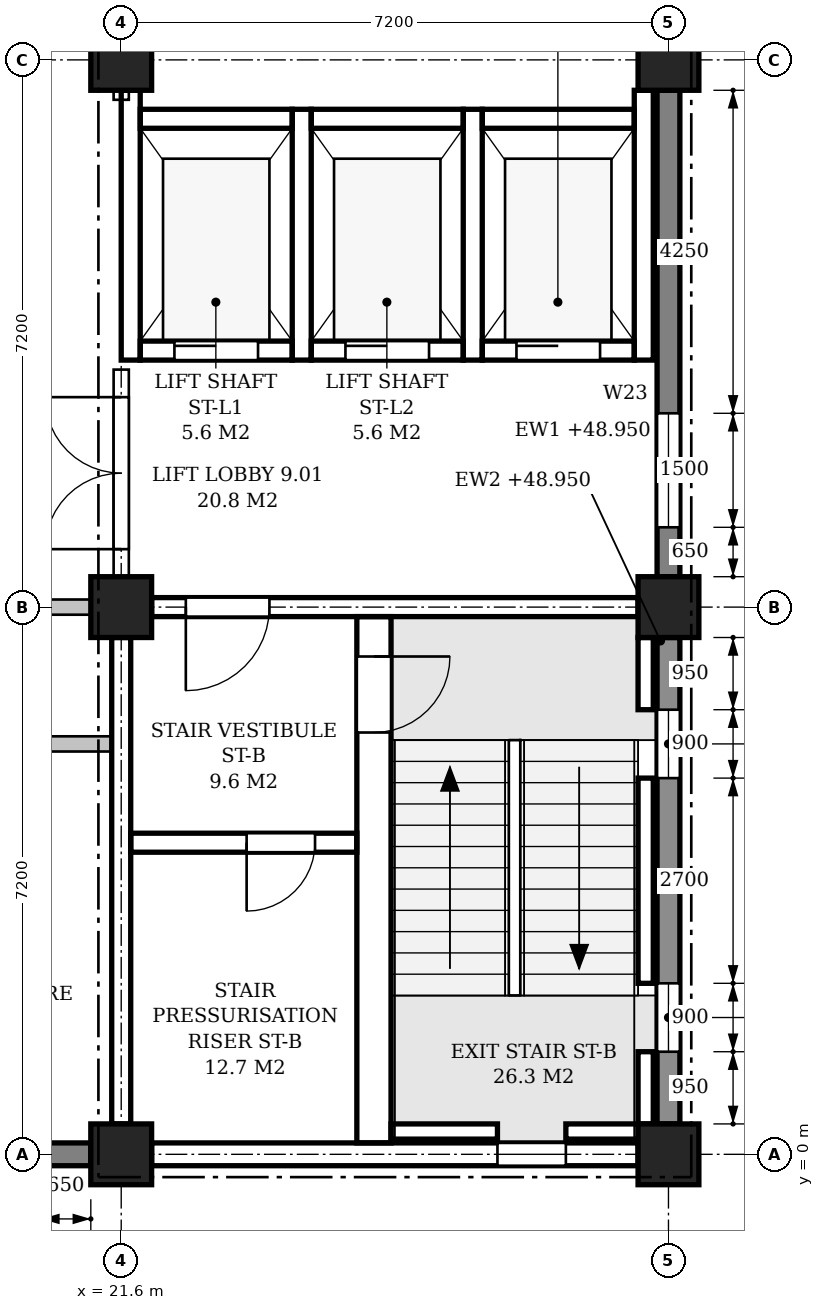
"""IFC4 building model, lengths in metres.
Left out: names, types, materials, properties, quantities, classifications, styles, units other than length and angle.
Written with IfcOpenShell. Run it as: python <this file> out.ifc"""

import sys

from ifc_helpers import new_model, si_unit, direction, frame, frame_2d, origin, origin_2d, place, context, subcontext, project, spatial, polyline, rectangle, outline, extrude, element, fill, save


model = new_model("IFC4")
c1 = context("Model", 3, precision=1e-05, world=origin(), true_north=direction((0.0, 1.0)))
c2 = subcontext(c1, "Body", "Model", "MODEL_VIEW")
j1 = project(units=[si_unit("LENGTHUNIT", "METRE"), si_unit("PLANEANGLEUNIT", "RADIAN")], contexts=[c1])
p1 = place(None, origin())
s1 = spatial("IfcSite", under=j1, at=p1, CompositionType="ELEMENT")
p2 = place(p1, origin())
s2 = spatial("IfcBuilding", under=s1, at=p2, CompositionType="ELEMENT")
p3 = place(p2, frame((0.0, 0.0, 45.3)))
s3 = spatial("IfcBuildingStorey", under=s2, at=p3, CompositionType="ELEMENT", Elevation=45.3)
for number, where, z_axis, x_axis in (
    (1, (21.6, 0.0, 0.0), (0.0, 0.0, 1.0), (1.0, 0.0, 0.0)),
    (2, (21.6, 7.2, 0.0), (0.0, 0.0, 1.0), (1.0, 0.0, 0.0)),
    (3, (21.6, 14.4, 0.0), (0.0, 0.0, 1.0), (1.0, 0.0, 0.0)),
    (4, (28.8, 0.0, 0.0), (0.0, 0.0, 1.0), (1.0, 0.0, 0.0)),
    (5, (28.8, 7.2, 0.0), (0.0, 0.0, 1.0), (1.0, 0.0, 0.0)),
    (6, (28.8, 14.4, 0.0), (0.0, 0.0, 1.0), (1.0, 0.0, 0.0)),
):
    element("IfcColumn", number, at=place(p3, frame(where, z_axis=z_axis, x_axis=x_axis)), inside=s3, PredefinedType="COLUMN", context=c2, shape_type="SweptSolid", body=[
        extrude(rectangle(XDim=0.8, YDim=0.8, at=origin_2d()), origin(), (0.0, 0.0, 1.0), 4.5),
    ])
p4 = place(p3, frame((14.8, 0.0, 0.0), z_axis=(0.0, 0.0, 1.0), x_axis=(1.0, 0.0, 0.0)))
e7 = element("IfcWall", 7, at=p4, inside=s3, PredefinedType="STANDARD", context=c2, shape_type="SweptSolid", body=[
    extrude(rectangle(XDim=6.4, YDim=0.3, at=frame_2d((3.2, 0.0))), origin(), (0.0, 0.0, 1.0), 3.65),
])
p5 = place(p4, frame((0.65, 0.0, 0.9)))
e8 = element("IfcOpeningElement", 8, at=p5, cuts=e7, PredefinedType="OPENING", context=c2, shape_type="SweptSolid", body=[
    extrude(outline(polyline([(0.0, 0.0), (1.5, 0.0), (1.5, 1.95), (0.75, 2.7), (0.0, 1.95), (0.0, 0.0)])), frame((0.0, 0.16, 0.0), z_axis=(0.0, -1.0, 0.0), x_axis=(1.0, 0.0, 0.0)), (0.0, 0.0, 1.0), 0.32),
])
p6 = place(p4, frame((4.25, 0.0, 0.9)))
e9 = element("IfcOpeningElement", 9, at=p6, cuts=e7, PredefinedType="OPENING", context=c2, shape_type="SweptSolid", body=[
    extrude(outline(polyline([(0.0, 0.0), (1.5, 0.0), (1.5, 1.95), (0.75, 2.7), (0.0, 1.95), (0.0, 0.0)])), frame((0.0, 0.16, 0.0), z_axis=(0.0, -1.0, 0.0), x_axis=(1.0, 0.0, 0.0)), (0.0, 0.0, 1.0), 0.32),
])
p7 = place(p3, frame((22.0, 0.0, 0.0), z_axis=(0.0, 0.0, 1.0), x_axis=(1.0, 0.0, 0.0)))
e10 = element("IfcWall", 10, at=p7, inside=s3, PredefinedType="STANDARD", context=c2, shape_type="SweptSolid", body=[
    extrude(rectangle(XDim=6.4, YDim=0.3, at=frame_2d((3.2, 0.0))), origin(), (0.0, 0.0, 1.0), 3.65),
])
p8 = place(p7, frame((4.55, 0.0, 0.9)))
e11 = element("IfcOpeningElement", 11, at=p8, cuts=e10, PredefinedType="OPENING", context=c2, shape_type="SweptSolid", body=[
    extrude(outline(polyline([(0.0, 0.0), (0.9, 0.0), (0.9, 2.25), (0.45, 2.7), (0.0, 2.25), (0.0, 0.0)])), frame((0.0, 0.16, 0.0), z_axis=(0.0, -1.0, 0.0), x_axis=(1.0, 0.0, 0.0)), (0.0, 0.0, 1.0), 0.32),
])
p9 = place(p3, frame((28.8, 0.4, 0.0), z_axis=(0.0, 0.0, 1.0), x_axis=(0.0, 1.0, 0.0)))
e12 = element("IfcWall", 12, at=p9, inside=s3, PredefinedType="STANDARD", context=c2, shape_type="SweptSolid", body=[
    extrude(rectangle(XDim=6.4, YDim=0.3, at=frame_2d((3.2, 0.0))), origin(), (0.0, 0.0, 1.0), 3.65),
])
p10 = place(p9, frame((0.95, 0.0, 0.9)))
e13 = element("IfcOpeningElement", 13, at=p10, cuts=e12, PredefinedType="OPENING", context=c2, shape_type="SweptSolid", body=[
    extrude(outline(polyline([(0.0, 0.0), (0.9, 0.0), (0.9, 2.25), (0.45, 2.7), (0.0, 2.25), (0.0, 0.0)])), frame((0.0, 0.16, 0.0), z_axis=(0.0, -1.0, 0.0), x_axis=(1.0, 0.0, 0.0)), (0.0, 0.0, 1.0), 0.32),
])
p11 = place(p9, frame((4.55, 0.0, 0.9)))
e14 = element("IfcOpeningElement", 14, at=p11, cuts=e12, PredefinedType="OPENING", context=c2, shape_type="SweptSolid", body=[
    extrude(outline(polyline([(0.0, 0.0), (0.9, 0.0), (0.9, 2.25), (0.45, 2.7), (0.0, 2.25), (0.0, 0.0)])), frame((0.0, 0.16, 0.0), z_axis=(0.0, -1.0, 0.0), x_axis=(1.0, 0.0, 0.0)), (0.0, 0.0, 1.0), 0.32),
])
p12 = place(p3, frame((28.8, 7.6, 0.0), z_axis=(0.0, 0.0, 1.0), x_axis=(0.0, 1.0, 0.0)))
e15 = element("IfcWall", 15, at=p12, inside=s3, PredefinedType="STANDARD", context=c2, shape_type="SweptSolid", body=[
    extrude(rectangle(XDim=6.4, YDim=0.3, at=frame_2d((3.2, 0.0))), origin(), (0.0, 0.0, 1.0), 3.65),
])
p13 = place(p12, frame((0.65, 0.0, 0.9)))
e16 = element("IfcOpeningElement", 16, at=p13, cuts=e15, PredefinedType="OPENING", context=c2, shape_type="SweptSolid", body=[
    extrude(outline(polyline([(0.0, 0.0), (1.5, 0.0), (1.5, 1.95), (0.75, 2.7), (0.0, 1.95), (0.0, 0.0)])), frame((0.0, 0.16, 0.0), z_axis=(0.0, -1.0, 0.0), x_axis=(1.0, 0.0, 0.0)), (0.0, 0.0, 1.0), 0.32),
])
p14 = place(p3, frame((22.0, 7.2, 0.0), z_axis=(0.0, 0.0, 1.0), x_axis=(1.0, 0.0, 0.0)))
e17 = element("IfcWall", 17, at=p14, inside=s3, PredefinedType="SHEAR", context=c2, shape_type="SweptSolid", body=[
    extrude(rectangle(XDim=6.4, YDim=0.25, at=frame_2d((3.2, 0.0))), origin(), (0.0, 0.0, 1.0), 3.55),
])
p15 = place(p14, frame((0.45, 0.0, 0.0)))
e18 = element("IfcOpeningElement", 18, at=p15, cuts=e17, PredefinedType="OPENING", context=c2, shape_type="SweptSolid", body=[
    extrude(rectangle(XDim=1.1, YDim=2.1, at=frame_2d((0.55, 1.05))), frame((0.0, 0.135, 0.0), z_axis=(0.0, -1.0, 0.0), x_axis=(1.0, 0.0, 0.0)), (0.0, 0.0, 1.0), 0.27),
])
p16 = place(p3, frame((21.6, 0.4, 0.0), z_axis=(0.0, 0.0, 1.0), x_axis=(0.0, 1.0, 0.0)))
e19 = element("IfcWall", 19, at=p16, inside=s3, PredefinedType="SHEAR", context=c2, shape_type="SweptSolid", body=[
    extrude(rectangle(XDim=6.4, YDim=0.25, at=frame_2d((3.2, 0.0))), origin(), (0.0, 0.0, 1.0), 3.55),
])
p17 = place(p3, frame((28.5, 0.4, -0.25), z_axis=(0.0, 0.0, 1.0), x_axis=(0.0, 1.0, 0.0)))
e20 = element("IfcWall", 20, at=p17, inside=s3, PredefinedType="SHEAR", context=c2, shape_type="SweptSolid", body=[
    extrude(rectangle(XDim=0.95, YDim=0.2, at=frame_2d((0.475, 0.0))), origin(), (0.0, 0.0, 1.0), 4.5),
])
p18 = place(p3, frame((28.5, 2.25, -0.25), z_axis=(0.0, 0.0, 1.0), x_axis=(0.0, 1.0, 0.0)))
e21 = element("IfcWall", 21, at=p18, inside=s3, PredefinedType="SHEAR", context=c2, shape_type="SweptSolid", body=[
    extrude(rectangle(XDim=2.7, YDim=0.2, at=frame_2d((1.35, 0.0))), origin(), (0.0, 0.0, 1.0), 4.5),
])
p19 = place(p3, frame((28.5, 5.85, -0.25), z_axis=(0.0, 0.0, 1.0), x_axis=(0.0, 1.0, 0.0)))
e22 = element("IfcWall", 22, at=p19, inside=s3, PredefinedType="SHEAR", context=c2, shape_type="SweptSolid", body=[
    extrude(rectangle(XDim=0.95, YDim=0.2, at=frame_2d((0.475, 0.0))), origin(), (0.0, 0.0, 1.0), 4.5),
])
p20 = place(p3, frame((25.15, 0.3, -0.25), z_axis=(0.0, 0.0, 1.0), x_axis=(1.0, 0.0, 0.0)))
e23 = element("IfcWall", 23, at=p20, inside=s3, PredefinedType="SHEAR", context=c2, shape_type="SweptSolid", body=[
    extrude(rectangle(XDim=1.4, YDim=0.2, at=frame_2d((0.7, 0.0))), origin(), (0.0, 0.0, 1.0), 4.5),
])
p21 = place(p3, frame((27.45, 0.3, -0.25), z_axis=(0.0, 0.0, 1.0), x_axis=(1.0, 0.0, 0.0)))
e24 = element("IfcWall", 24, at=p21, inside=s3, PredefinedType="SHEAR", context=c2, shape_type="SweptSolid", body=[
    extrude(rectangle(XDim=0.95, YDim=0.2, at=frame_2d((0.475, 0.0))), origin(), (0.0, 0.0, 1.0), 4.5),
])
p22 = place(p3, frame((24.925, 0.15, 0.0), z_axis=(0.0, 0.0, 1.0), x_axis=(0.0, 1.0, 0.0)))
e25 = element("IfcWall", 25, at=p22, inside=s3, PredefinedType="SHEAR", context=c2, shape_type="SweptSolid", body=[
    extrude(rectangle(XDim=6.925, YDim=0.45, at=frame_2d((3.462, 0.0))), origin(), (0.0, 0.0, 1.0), 4.25),
])
p23 = place(p22, frame((5.4, 0.0, 0.0)))
e26 = element("IfcOpeningElement", 26, at=p23, cuts=e25, PredefinedType="OPENING", context=c2, shape_type="SweptSolid", body=[
    extrude(rectangle(XDim=1.0, YDim=2.1, at=frame_2d((0.5, 1.05))), frame((0.0, 0.235, 0.0), z_axis=(0.0, -1.0, 0.0), x_axis=(1.0, 0.0, 0.0)), (0.0, 0.0, 1.0), 0.47),
])
p24 = place(p3, frame((21.725, 4.1, 0.0), z_axis=(0.0, 0.0, 1.0), x_axis=(1.0, 0.0, 0.0)))
e27 = element("IfcWall", 27, at=p24, inside=s3, PredefinedType="SHEAR", context=c2, shape_type="SweptSolid", body=[
    extrude(rectangle(XDim=2.975, YDim=0.25, at=frame_2d((1.487, 0.0))), origin(), (0.0, 0.0, 1.0), 4.25),
])
p25 = place(p24, frame((1.525, 0.0, 0.0)))
e28 = element("IfcOpeningElement", 28, at=p25, cuts=e27, PredefinedType="OPENING", context=c2, shape_type="SweptSolid", body=[
    extrude(rectangle(XDim=0.9, YDim=2.1, at=frame_2d((0.45, 1.05))), frame((0.0, 0.135, 0.0), z_axis=(0.0, -1.0, 0.0), x_axis=(1.0, 0.0, 0.0)), (0.0, 0.0, 1.0), 0.27),
])
p26 = place(p3, frame((21.725, 10.45, -0.25), z_axis=(0.0, 0.0, 1.0), x_axis=(0.0, 1.0, 0.0)))
e29 = element("IfcWall", 29, at=p26, inside=s3, PredefinedType="SHEAR", context=c2, shape_type="SweptSolid", body=[
    extrude(rectangle(XDim=3.55, YDim=0.25, at=frame_2d((1.775, 0.0))), origin(), (0.0, 0.0, 1.0), 3.8),
])
for number, where, z_axis, x_axis in (
    (30, (23.975, 10.45, -0.25), (0.0, 0.0, 1.0), (0.0, 1.0, 0.0)),
    (31, (26.225, 10.45, -0.25), (0.0, 0.0, 1.0), (0.0, 1.0, 0.0)),
):
    element("IfcWall", number, at=place(p3, frame(where, z_axis=z_axis, x_axis=x_axis)), inside=s3, PredefinedType="SHEAR", context=c2, shape_type="SweptSolid", body=[
        extrude(rectangle(XDim=3.3, YDim=0.25, at=frame_2d((1.65, 0.0))), origin(), (0.0, 0.0, 1.0), 4.5),
    ])
p27 = place(p3, frame((28.475, 10.45, -0.25), z_axis=(0.0, 0.0, 1.0), x_axis=(0.0, 1.0, 0.0)))
e32 = element("IfcWall", 32, at=p27, inside=s3, PredefinedType="SHEAR", context=c2, shape_type="SweptSolid", body=[
    extrude(rectangle(XDim=3.55, YDim=0.25, at=frame_2d((1.775, 0.0))), origin(), (0.0, 0.0, 1.0), 4.5),
])
p28 = place(p3, frame((21.85, 10.575, -0.25), z_axis=(0.0, 0.0, 1.0), x_axis=(1.0, 0.0, 0.0)))
e33 = element("IfcWall", 33, at=p28, inside=s3, PredefinedType="SHEAR", context=c2, shape_type="SweptSolid", body=[
    extrude(rectangle(XDim=2.0, YDim=0.25, at=frame_2d((1.0, 0.0))), origin(), (0.0, 0.0, 1.0), 4.5),
])
p29 = place(p28, frame((0.45, 0.0, 0.25)))
e34 = element("IfcOpeningElement", 34, at=p29, cuts=e33, PredefinedType="OPENING", context=c2, shape_type="SweptSolid", body=[
    extrude(rectangle(XDim=1.1, YDim=2.1, at=frame_2d((0.55, 1.05))), frame((0.0, 0.135, 0.0), z_axis=(0.0, -1.0, 0.0), x_axis=(1.0, 0.0, 0.0)), (0.0, 0.0, 1.0), 0.27),
])
p30 = place(p3, frame((21.85, 13.625, -0.25), z_axis=(0.0, 0.0, 1.0), x_axis=(1.0, 0.0, 0.0)))
e35 = element("IfcWall", 35, at=p30, inside=s3, PredefinedType="SHEAR", context=c2, shape_type="SweptSolid", body=[
    extrude(rectangle(XDim=2.0, YDim=0.25, at=frame_2d((1.0, 0.0))), origin(), (0.0, 0.0, 1.0), 4.5),
])
p31 = place(p3, frame((24.1, 10.575, -0.25), z_axis=(0.0, 0.0, 1.0), x_axis=(1.0, 0.0, 0.0)))
e36 = element("IfcWall", 36, at=p31, inside=s3, PredefinedType="SHEAR", context=c2, shape_type="SweptSolid", body=[
    extrude(rectangle(XDim=2.0, YDim=0.25, at=frame_2d((1.0, 0.0))), origin(), (0.0, 0.0, 1.0), 4.5),
])
p32 = place(p31, frame((0.45, 0.0, 0.25)))
e37 = element("IfcOpeningElement", 37, at=p32, cuts=e36, PredefinedType="OPENING", context=c2, shape_type="SweptSolid", body=[
    extrude(rectangle(XDim=1.1, YDim=2.1, at=frame_2d((0.55, 1.05))), frame((0.0, 0.135, 0.0), z_axis=(0.0, -1.0, 0.0), x_axis=(1.0, 0.0, 0.0)), (0.0, 0.0, 1.0), 0.27),
])
p33 = place(p3, frame((24.1, 13.625, -0.25), z_axis=(0.0, 0.0, 1.0), x_axis=(1.0, 0.0, 0.0)))
e38 = element("IfcWall", 38, at=p33, inside=s3, PredefinedType="SHEAR", context=c2, shape_type="SweptSolid", body=[
    extrude(rectangle(XDim=2.0, YDim=0.25, at=frame_2d((1.0, 0.0))), origin(), (0.0, 0.0, 1.0), 4.5),
])
p34 = place(p3, frame((26.35, 10.575, -0.25), z_axis=(0.0, 0.0, 1.0), x_axis=(1.0, 0.0, 0.0)))
e39 = element("IfcWall", 39, at=p34, inside=s3, PredefinedType="SHEAR", context=c2, shape_type="SweptSolid", body=[
    extrude(rectangle(XDim=2.0, YDim=0.25, at=frame_2d((1.0, 0.0))), origin(), (0.0, 0.0, 1.0), 4.5),
])
p35 = place(p34, frame((0.45, 0.0, 0.25)))
e40 = element("IfcOpeningElement", 40, at=p35, cuts=e39, PredefinedType="OPENING", context=c2, shape_type="SweptSolid", body=[
    extrude(rectangle(XDim=1.1, YDim=2.1, at=frame_2d((0.55, 1.05))), frame((0.0, 0.135, 0.0), z_axis=(0.0, -1.0, 0.0), x_axis=(1.0, 0.0, 0.0)), (0.0, 0.0, 1.0), 0.27),
])
p36 = place(p3, frame((26.35, 13.625, -0.25), z_axis=(0.0, 0.0, 1.0), x_axis=(1.0, 0.0, 0.0)))
e41 = element("IfcWall", 41, at=p36, inside=s3, PredefinedType="SHEAR", context=c2, shape_type="SweptSolid", body=[
    extrude(rectangle(XDim=2.0, YDim=0.25, at=frame_2d((1.0, 0.0))), origin(), (0.0, 0.0, 1.0), 4.5),
])
p37 = place(p3, frame((7.325, 5.4, 0.0), z_axis=(0.0, 0.0, 1.0), x_axis=(1.0, 0.0, 0.0)))
e42 = element("IfcWall", 42, at=p37, inside=s3, PredefinedType="PARTITIONING", context=c2, shape_type="SweptSolid", body=[
    extrude(outline(polyline([(0.0, 0.0), (14.15, 0.0), (14.15, 3.55), (14.05, 3.55), (14.05, 4.25), (7.3, 4.25), (7.3, 3.55), (6.85, 3.55), (6.85, 4.25), (0.1, 4.25), (0.1, 3.55), (0.0, 3.55), (0.0, 0.0)])), frame((0.0, 0.1, 0.0), z_axis=(0.0, -1.0, 0.0), x_axis=(1.0, 0.0, 0.0)), (0.0, 0.0, 1.0), 0.2),
])
p38 = place(p37, frame((1.238, 0.0, 0.0)))
e43 = element("IfcOpeningElement", 43, at=p38, cuts=e42, PredefinedType="OPENING", context=c2, shape_type="SweptSolid", body=[
    extrude(rectangle(XDim=1.0, YDim=2.1, at=frame_2d((0.5, 1.05))), frame((0.0, 0.11, 0.0), z_axis=(0.0, -1.0, 0.0), x_axis=(1.0, 0.0, 0.0)), (0.0, 0.0, 1.0), 0.22),
])
p39 = place(p37, frame((4.775, 0.0, 0.0)))
e44 = element("IfcOpeningElement", 44, at=p39, cuts=e42, PredefinedType="OPENING", context=c2, shape_type="SweptSolid", body=[
    extrude(rectangle(XDim=1.0, YDim=2.1, at=frame_2d((0.5, 1.05))), frame((0.0, 0.11, 0.0), z_axis=(0.0, -1.0, 0.0), x_axis=(1.0, 0.0, 0.0)), (0.0, 0.0, 1.0), 0.22),
])
p40 = place(p37, frame((8.375, 0.0, 0.0)))
e45 = element("IfcOpeningElement", 45, at=p40, cuts=e42, PredefinedType="OPENING", context=c2, shape_type="SweptSolid", body=[
    extrude(rectangle(XDim=1.0, YDim=2.1, at=frame_2d((0.5, 1.05))), frame((0.0, 0.11, 0.0), z_axis=(0.0, -1.0, 0.0), x_axis=(1.0, 0.0, 0.0)), (0.0, 0.0, 1.0), 0.22),
])
p41 = place(p37, frame((11.913, 0.0, 0.0)))
e46 = element("IfcOpeningElement", 46, at=p41, cuts=e42, PredefinedType="OPENING", context=c2, shape_type="SweptSolid", body=[
    extrude(rectangle(XDim=1.0, YDim=2.1, at=frame_2d((0.5, 1.05))), frame((0.0, 0.11, 0.0), z_axis=(0.0, -1.0, 0.0), x_axis=(1.0, 0.0, 0.0)), (0.0, 0.0, 1.0), 0.22),
])
p42 = place(p3, frame((14.8, 7.2, 0.0), z_axis=(0.0, 0.0, 1.0), x_axis=(1.0, 0.0, 0.0)))
e47 = element("IfcWall", 47, at=p42, inside=s3, PredefinedType="PARTITIONING", context=c2, shape_type="SweptSolid", body=[
    extrude(rectangle(XDim=6.4, YDim=0.2, at=frame_2d((3.2, 0.0))), origin(), (0.0, 0.0, 1.0), 3.55),
])
p43 = place(p42, frame((4.3, 0.0, 0.0)))
e48 = element("IfcOpeningElement", 48, at=p43, cuts=e47, PredefinedType="OPENING", context=c2, shape_type="SweptSolid", body=[
    extrude(rectangle(XDim=1.0, YDim=2.1, at=frame_2d((0.5, 1.05))), frame((0.0, 0.11, 0.0), z_axis=(0.0, -1.0, 0.0), x_axis=(1.0, 0.0, 0.0)), (0.0, 0.0, 1.0), 0.22),
])
p44 = place(p3, frame((21.6, 7.6, 0.0), z_axis=(0.0, 0.0, 1.0), x_axis=(0.0, 1.0, 0.0)))
e49 = element("IfcWall", 49, at=p44, inside=s3, PredefinedType="PARTITIONING", context=c2, shape_type="SweptSolid", body=[
    extrude(rectangle(XDim=2.725, YDim=0.2, at=frame_2d((1.362, 0.0))), origin(), (0.0, 0.0, 1.0), 3.55),
])
p45 = place(p44, frame((0.362, 0.0, 0.0)))
e50 = element("IfcOpeningElement", 50, at=p45, cuts=e49, PredefinedType="OPENING", context=c2, shape_type="SweptSolid", body=[
    extrude(rectangle(XDim=2.0, YDim=2.4, at=frame_2d((1.0, 1.2))), frame((0.0, 0.11, 0.0), z_axis=(0.0, -1.0, 0.0), x_axis=(1.0, 0.0, 0.0)), (0.0, 0.0, 1.0), 0.22),
])
p46 = place(p3, frame((21.6, 13.875, 0.0), z_axis=(0.0, 0.0, 1.0), x_axis=(0.0, 1.0, 0.0)))
e51 = element("IfcWall", 51, at=p46, inside=s3, PredefinedType="PARTITIONING", context=c2, shape_type="SweptSolid", body=[
    extrude(rectangle(XDim=0.125, YDim=0.2, at=frame_2d((0.062, 0.0))), origin(), (0.0, 0.0, 1.0), 3.55),
])
p47 = place(p10, origin())
e52 = element("IfcWindow", 52, at=p47, inside=s3, PartitioningType="SINGLE_PANEL", PredefinedType="WINDOW", context=c2, shape_type="SweptSolid", body=[
    extrude(outline(polyline([(0.0, 0.0), (0.9, 0.0), (0.9, 2.25), (0.45, 2.7), (0.0, 2.25), (0.0, 0.0)])), frame((0.0, 0.03, 0.0), z_axis=(0.0, -1.0, 0.0), x_axis=(1.0, 0.0, 0.0)), (0.0, 0.0, 1.0), 0.06),
])
fill(e13, e52)
p48 = place(p11, origin())
e53 = element("IfcWindow", 53, at=p48, inside=s3, PartitioningType="SINGLE_PANEL", PredefinedType="WINDOW", context=c2, shape_type="SweptSolid", body=[
    extrude(outline(polyline([(0.0, 0.0), (0.9, 0.0), (0.9, 2.25), (0.45, 2.7), (0.0, 2.25), (0.0, 0.0)])), frame((0.0, 0.03, 0.0), z_axis=(0.0, -1.0, 0.0), x_axis=(1.0, 0.0, 0.0)), (0.0, 0.0, 1.0), 0.06),
])
fill(e14, e53)
p49 = place(p13, origin())
e54 = element("IfcWindow", 54, at=p49, inside=s3, PartitioningType="SINGLE_PANEL", PredefinedType="WINDOW", context=c2, shape_type="SweptSolid", body=[
    extrude(outline(polyline([(0.0, 0.0), (1.5, 0.0), (1.5, 1.95), (0.75, 2.7), (0.0, 1.95), (0.0, 0.0)])), frame((0.0, 0.03, 0.0), z_axis=(0.0, -1.0, 0.0), x_axis=(1.0, 0.0, 0.0)), (0.0, 0.0, 1.0), 0.06),
])
fill(e16, e54)
p50 = place(p8, origin())
e55 = element("IfcWindow", 55, at=p50, inside=s3, PartitioningType="SINGLE_PANEL", PredefinedType="WINDOW", context=c2, shape_type="SweptSolid", body=[
    extrude(outline(polyline([(0.0, 0.0), (0.9, 0.0), (0.9, 2.25), (0.45, 2.7), (0.0, 2.25), (0.0, 0.0)])), frame((0.0, 0.03, 0.0), z_axis=(0.0, -1.0, 0.0), x_axis=(1.0, 0.0, 0.0)), (0.0, 0.0, 1.0), 0.06),
])
fill(e11, e55)
p51 = place(p23, frame((1.0, 0.0, 0.0), z_axis=(0.0, 0.0, 1.0), x_axis=(-1.0, 0.0, 0.0)))
e56 = element("IfcDoor", 56, at=p51, inside=s3, OperationType="SINGLE_SWING_LEFT", PredefinedType="DOOR", context=c2, shape_type="SweptSolid", body=[
    extrude(rectangle(XDim=1.0, YDim=2.1, at=frame_2d((0.5, 1.05))), frame((0.0, 0.025, 0.0), z_axis=(0.0, -1.0, 0.0), x_axis=(1.0, 0.0, 0.0)), (0.0, 0.0, 1.0), 0.05),
])
fill(e26, e56)
p52 = place(p15, frame((1.1, 0.0, 0.0), z_axis=(0.0, 0.0, 1.0), x_axis=(-1.0, 0.0, 0.0)))
e57 = element("IfcDoor", 57, at=p52, inside=s3, OperationType="SINGLE_SWING_RIGHT", PredefinedType="DOOR", context=c2, shape_type="SweptSolid", body=[
    extrude(rectangle(XDim=1.1, YDim=2.1, at=frame_2d((0.55, 1.05))), frame((0.0, 0.025, 0.0), z_axis=(0.0, -1.0, 0.0), x_axis=(1.0, 0.0, 0.0)), (0.0, 0.0, 1.0), 0.05),
])
fill(e18, e57)
p53 = place(p25, frame((0.9, 0.0, 0.0), z_axis=(0.0, 0.0, 1.0), x_axis=(-1.0, 0.0, 0.0)))
e58 = element("IfcDoor", 58, at=p53, inside=s3, OperationType="SINGLE_SWING_RIGHT", PredefinedType="DOOR", context=c2, shape_type="SweptSolid", body=[
    extrude(rectangle(XDim=0.9, YDim=2.1, at=frame_2d((0.45, 1.05))), frame((0.0, 0.025, 0.0), z_axis=(0.0, -1.0, 0.0), x_axis=(1.0, 0.0, 0.0)), (0.0, 0.0, 1.0), 0.05),
])
fill(e28, e58)
p54 = place(p29, origin())
e59 = element("IfcDoor", 59, at=p54, inside=s3, OperationType="SLIDING_TO_LEFT", PredefinedType="DOOR", context=c2, shape_type="SweptSolid", body=[
    extrude(rectangle(XDim=1.1, YDim=2.1, at=frame_2d((0.55, 1.05))), frame((0.0, 0.025, 0.0), z_axis=(0.0, -1.0, 0.0), x_axis=(1.0, 0.0, 0.0)), (0.0, 0.0, 1.0), 0.05),
])
fill(e34, e59)
p55 = place(p32, origin())
e60 = element("IfcDoor", 60, at=p55, inside=s3, OperationType="SLIDING_TO_LEFT", PredefinedType="DOOR", context=c2, shape_type="SweptSolid", body=[
    extrude(rectangle(XDim=1.1, YDim=2.1, at=frame_2d((0.55, 1.05))), frame((0.0, 0.025, 0.0), z_axis=(0.0, -1.0, 0.0), x_axis=(1.0, 0.0, 0.0)), (0.0, 0.0, 1.0), 0.05),
])
fill(e37, e60)
p56 = place(p35, origin())
e61 = element("IfcDoor", 61, at=p56, inside=s3, OperationType="SLIDING_TO_LEFT", PredefinedType="DOOR", context=c2, shape_type="SweptSolid", body=[
    extrude(rectangle(XDim=1.1, YDim=2.1, at=frame_2d((0.55, 1.05))), frame((0.0, 0.025, 0.0), z_axis=(0.0, -1.0, 0.0), x_axis=(1.0, 0.0, 0.0)), (0.0, 0.0, 1.0), 0.05),
])
fill(e40, e61)
p57 = place(p45, origin())
e62 = element("IfcDoor", 62, at=p57, inside=s3, OperationType="DOUBLE_DOOR_SINGLE_SWING", PredefinedType="DOOR", context=c2, shape_type="SweptSolid", body=[
    extrude(rectangle(XDim=2.0, YDim=2.4, at=frame_2d((1.0, 1.2))), frame((0.0, 0.025, 0.0), z_axis=(0.0, -1.0, 0.0), x_axis=(1.0, 0.0, 0.0)), (0.0, 0.0, 1.0), 0.05),
])
fill(e50, e62)
save(model, sys.argv[1])
